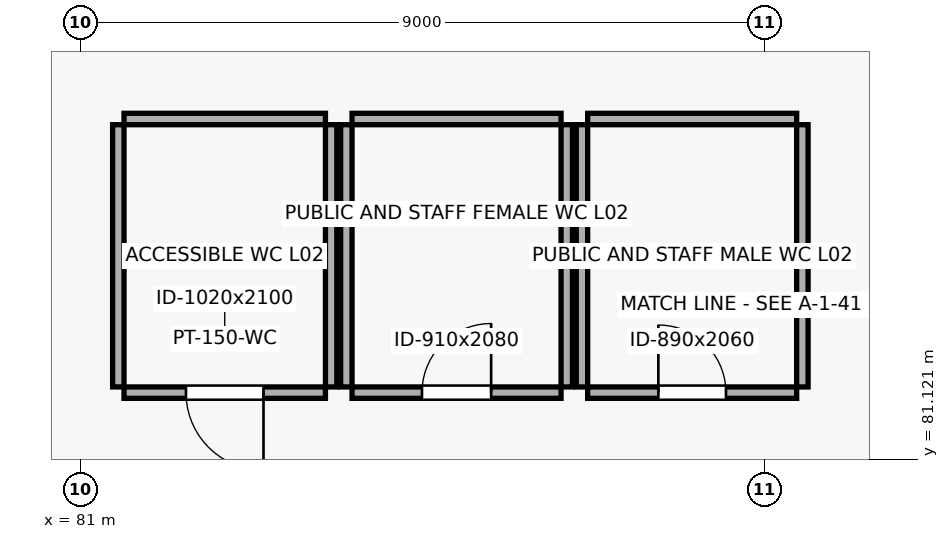
"""IFC4 building model, lengths in metres.
Left out: names, types, materials, properties, quantities, classifications, styles, units other than length and angle.
Written with IfcOpenShell. Run it as: python <this file> out.ifc"""

import sys

from ifc_helpers import new_model, si_unit, direction, frame, frame_2d, origin, place, context, subcontext, project, spatial, rectangle, extrude, element, fill, save


model = new_model("IFC4")
c1 = context("Model", 3, precision=1e-05, world=origin(), true_north=direction((0.0, 1.0)))
c2 = subcontext(c1, "Body", "Model", "MODEL_VIEW")
j1 = project(units=[si_unit("LENGTHUNIT", "METRE"), si_unit("PLANEANGLEUNIT", "RADIAN")], contexts=[c1])
p1 = place(None, origin())
s1 = spatial("IfcSite", under=j1, at=p1, CompositionType="ELEMENT")
p2 = place(p1, origin())
s2 = spatial("IfcBuilding", under=s1, at=p2, CompositionType="ELEMENT")
p3 = place(p2, frame((0.0, 0.0, 9.0)))
s3 = spatial("IfcBuildingStorey", under=s2, at=p3, CompositionType="ELEMENT", Elevation=9.0)
p4 = place(p3, frame((81.575, 82.0, 0.0), z_axis=(0.0, 0.0, 1.0), x_axis=(1.0, 0.0, 0.0)))
e1 = element("IfcWall", 1, at=p4, inside=s3, PredefinedType="PARTITIONING", context=c2, shape_type="SweptSolid", body=[
    extrude(rectangle(XDim=2.65, YDim=0.15, at=frame_2d((1.325, 0.0))), origin(), (0.0, 0.0, 1.0), 4.14),
])
p5 = place(p4, frame((0.815, 0.0, 0.0)))
e2 = element("IfcOpeningElement", 2, at=p5, cuts=e1, PredefinedType="OPENING", context=c2, shape_type="SweptSolid", body=[
    extrude(rectangle(XDim=1.02, YDim=2.1, at=frame_2d((0.51, 1.05))), frame((0.0, 0.087, 0.0), z_axis=(0.0, -1.0, 0.0), x_axis=(1.0, 0.0, 0.0)), (0.0, 0.0, 1.0), 0.174),
])
p6 = place(p3, frame((81.575, 85.6, 0.0), z_axis=(0.0, 0.0, 1.0), x_axis=(1.0, 0.0, 0.0)))
e3 = element("IfcWall", 3, at=p6, inside=s3, PredefinedType="PARTITIONING", context=c2, shape_type="SweptSolid", body=[
    extrude(rectangle(XDim=2.65, YDim=0.15, at=frame_2d((1.325, 0.0))), origin(), (0.0, 0.0, 1.0), 4.14),
])
for number, where, z_axis, x_axis in (
    (4, (81.5, 82.075, 0.0), (0.0, 0.0, 1.0), (0.0, 1.0, 0.0)),
    (5, (84.3, 82.075, 0.0), (0.0, 0.0, 1.0), (0.0, 1.0, 0.0)),
):
    element("IfcWall", number, at=place(p3, frame(where, z_axis=z_axis, x_axis=x_axis)), inside=s3, PredefinedType="PARTITIONING", context=c2, shape_type="SweptSolid", body=[
        extrude(rectangle(XDim=3.45, YDim=0.15, at=frame_2d((1.725, 0.0))), origin(), (0.0, 0.0, 1.0), 4.14),
    ])
p7 = place(p3, frame((84.575, 82.0, 0.0), z_axis=(0.0, 0.0, 1.0), x_axis=(1.0, 0.0, 0.0)))
e6 = element("IfcWall", 6, at=p7, inside=s3, PredefinedType="PARTITIONING", context=c2, shape_type="SweptSolid", body=[
    extrude(rectangle(XDim=2.75, YDim=0.15, at=frame_2d((1.375, 0.0))), origin(), (0.0, 0.0, 1.0), 4.14),
])
p8 = place(p7, frame((0.92, 0.0, 0.0)))
e7 = element("IfcOpeningElement", 7, at=p8, cuts=e6, PredefinedType="OPENING", context=c2, shape_type="SweptSolid", body=[
    extrude(rectangle(XDim=0.91, YDim=2.08, at=frame_2d((0.455, 1.04))), frame((0.0, 0.087, 0.0), z_axis=(0.0, -1.0, 0.0), x_axis=(1.0, 0.0, 0.0)), (0.0, 0.0, 1.0), 0.174),
])
p9 = place(p3, frame((84.575, 85.6, 0.0), z_axis=(0.0, 0.0, 1.0), x_axis=(1.0, 0.0, 0.0)))
e8 = element("IfcWall", 8, at=p9, inside=s3, PredefinedType="PARTITIONING", context=c2, shape_type="SweptSolid", body=[
    extrude(rectangle(XDim=2.75, YDim=0.15, at=frame_2d((1.375, 0.0))), origin(), (0.0, 0.0, 1.0), 4.14),
])
for number, where, z_axis, x_axis in (
    (9, (84.5, 82.075, 0.0), (0.0, 0.0, 1.0), (0.0, 1.0, 0.0)),
    (10, (87.4, 82.075, 0.0), (0.0, 0.0, 1.0), (0.0, 1.0, 0.0)),
):
    element("IfcWall", number, at=place(p3, frame(where, z_axis=z_axis, x_axis=x_axis)), inside=s3, PredefinedType="PARTITIONING", context=c2, shape_type="SweptSolid", body=[
        extrude(rectangle(XDim=3.45, YDim=0.15, at=frame_2d((1.725, 0.0))), origin(), (0.0, 0.0, 1.0), 4.14),
    ])
p10 = place(p3, frame((87.675, 82.0, 0.0), z_axis=(0.0, 0.0, 1.0), x_axis=(1.0, 0.0, 0.0)))
e11 = element("IfcWall", 11, at=p10, inside=s3, PredefinedType="PARTITIONING", context=c2, shape_type="SweptSolid", body=[
    extrude(rectangle(XDim=2.75, YDim=0.15, at=frame_2d((1.375, 0.0))), origin(), (0.0, 0.0, 1.0), 4.14),
])
p11 = place(p10, frame((0.93, 0.0, 0.0)))
e12 = element("IfcOpeningElement", 12, at=p11, cuts=e11, PredefinedType="OPENING", context=c2, shape_type="SweptSolid", body=[
    extrude(rectangle(XDim=0.89, YDim=2.06, at=frame_2d((0.445, 1.03))), frame((0.0, 0.087, 0.0), z_axis=(0.0, -1.0, 0.0), x_axis=(1.0, 0.0, 0.0)), (0.0, 0.0, 1.0), 0.174),
])
p12 = place(p3, frame((87.675, 85.6, 0.0), z_axis=(0.0, 0.0, 1.0), x_axis=(1.0, 0.0, 0.0)))
e13 = element("IfcWall", 13, at=p12, inside=s3, PredefinedType="PARTITIONING", context=c2, shape_type="SweptSolid", body=[
    extrude(rectangle(XDim=2.75, YDim=0.15, at=frame_2d((1.375, 0.0))), origin(), (0.0, 0.0, 1.0), 4.14),
])
for number, where, z_axis, x_axis in (
    (14, (87.6, 82.075, 0.0), (0.0, 0.0, 1.0), (0.0, 1.0, 0.0)),
    (15, (90.5, 82.075, 0.0), (0.0, 0.0, 1.0), (0.0, 1.0, 0.0)),
):
    element("IfcWall", number, at=place(p3, frame(where, z_axis=z_axis, x_axis=x_axis)), inside=s3, PredefinedType="PARTITIONING", context=c2, shape_type="SweptSolid", body=[
        extrude(rectangle(XDim=3.45, YDim=0.15, at=frame_2d((1.725, 0.0))), origin(), (0.0, 0.0, 1.0), 4.14),
    ])
p13 = place(p5, frame((1.02, 0.0, 0.0), z_axis=(0.0, 0.0, 1.0), x_axis=(-1.0, 0.0, 0.0)))
e16 = element("IfcDoor", 16, at=p13, inside=s3, OperationType="SINGLE_SWING_LEFT", PredefinedType="DOOR", context=c2, shape_type="SweptSolid", body=[
    extrude(rectangle(XDim=1.02, YDim=2.1, at=frame_2d((0.51, 1.05))), frame((0.0, 0.025, 0.0), z_axis=(0.0, -1.0, 0.0), x_axis=(1.0, 0.0, 0.0)), (0.0, 0.0, 1.0), 0.05),
])
fill(e2, e16)
p14 = place(p8, origin())
e17 = element("IfcDoor", 17, at=p14, inside=s3, OperationType="SINGLE_SWING_RIGHT", PredefinedType="DOOR", context=c2, shape_type="SweptSolid", body=[
    extrude(rectangle(XDim=0.91, YDim=2.08, at=frame_2d((0.455, 1.04))), frame((0.0, 0.025, 0.0), z_axis=(0.0, -1.0, 0.0), x_axis=(1.0, 0.0, 0.0)), (0.0, 0.0, 1.0), 0.05),
])
fill(e7, e17)
p15 = place(p11, origin())
e18 = element("IfcDoor", 18, at=p15, inside=s3, OperationType="SINGLE_SWING_LEFT", PredefinedType="DOOR", context=c2, shape_type="SweptSolid", body=[
    extrude(rectangle(XDim=0.89, YDim=2.06, at=frame_2d((0.445, 1.03))), frame((0.0, 0.025, 0.0), z_axis=(0.0, -1.0, 0.0), x_axis=(1.0, 0.0, 0.0)), (0.0, 0.0, 1.0), 0.05),
])
fill(e12, e18)
save(model, sys.argv[1])
